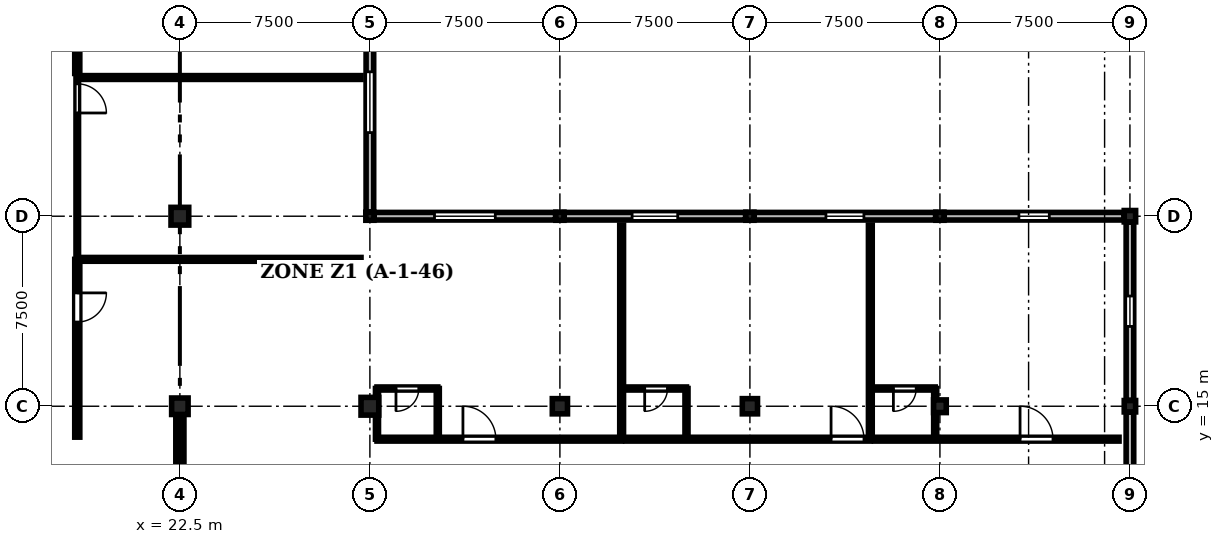
"""IFC4 building model, lengths in metres.
Left out: names, types, materials, properties, quantities, classifications, styles, units other than length and angle.
Written with IfcOpenShell. Run it as: python <this file> out.ifc"""

import sys

from ifc_helpers import new_model, si_unit, direction, frame, frame_2d, origin, origin_2d, place, context, subcontext, project, spatial, rectangle, extrude, element, fill, save


model = new_model("IFC4")
c1 = context("Model", 3, precision=1e-05, world=origin(), true_north=direction((0.0, 1.0)))
c2 = subcontext(c1, "Body", "Model", "MODEL_VIEW")
j1 = project(units=[si_unit("LENGTHUNIT", "METRE"), si_unit("PLANEANGLEUNIT", "RADIAN")], contexts=[c1])
p1 = place(None, origin())
s1 = spatial("IfcSite", under=j1, at=p1, CompositionType="ELEMENT")
p2 = place(p1, origin())
s2 = spatial("IfcBuilding", under=s1, at=p2, CompositionType="ELEMENT")
p3 = place(p2, frame((0.0, 0.0, 17.85)))
s3 = spatial("IfcBuildingStorey", under=s2, at=p3, CompositionType="ELEMENT", Elevation=17.85)
p4 = place(p3, frame((22.5, 15.0, 0.0), z_axis=(0.0, 0.0, 1.0), x_axis=(1.0, 0.0, 0.0)))
e1 = element("IfcColumn", 1, at=p4, inside=s3, PredefinedType="COLUMN", context=c2, shape_type="SweptSolid", body=[
    extrude(rectangle(XDim=0.65, YDim=0.65, at=origin_2d()), origin(), (0.0, 0.0, 1.0), 4.05),
])
for number, where, z_axis, x_axis in (
    (2, (22.5, 22.5, 0.0), (0.0, 0.0, 1.0), (1.0, 0.0, 0.0)),
    (3, (30.0, 15.0, 0.0), (0.0, 0.0, 1.0), (1.0, 0.0, 0.0)),
):
    element("IfcColumn", number, at=place(p3, frame(where, z_axis=z_axis, x_axis=x_axis)), inside=s3, PredefinedType="COLUMN", context=c2, shape_type="SweptSolid", body=[
        extrude(rectangle(XDim=0.7, YDim=0.7, at=origin_2d()), origin(), (0.0, 0.0, 1.0), 4.05),
    ])
p5 = place(p3, frame((30.0, 22.5, 0.0), z_axis=(0.0, 0.0, 1.0), x_axis=(1.0, 0.0, 0.0)))
e4 = element("IfcColumn", 4, at=p5, inside=s3, PredefinedType="COLUMN", context=c2, shape_type="SweptSolid", body=[
    extrude(rectangle(XDim=0.32, YDim=0.32, at=origin_2d()), origin(), (0.0, 0.0, 1.0), 4.05),
])
p6 = place(p3, frame((37.5, 15.0, 0.0), z_axis=(0.0, 0.0, 1.0), x_axis=(1.0, 0.0, 0.0)))
e5 = element("IfcColumn", 5, at=p6, inside=s3, PredefinedType="COLUMN", context=c2, shape_type="SweptSolid", body=[
    extrude(rectangle(XDim=0.6, YDim=0.6, at=origin_2d()), origin(), (0.0, 0.0, 1.0), 4.05),
])
p7 = place(p3, frame((37.5, 22.5, 0.0), z_axis=(0.0, 0.0, 1.0), x_axis=(1.0, 0.0, 0.0)))
e6 = element("IfcColumn", 6, at=p7, inside=s3, PredefinedType="COLUMN", context=c2, shape_type="SweptSolid", body=[
    extrude(rectangle(XDim=0.32, YDim=0.32, at=origin_2d()), origin(), (0.0, 0.0, 1.0), 4.05),
])
p8 = place(p3, frame((45.0, 15.0, 0.0), z_axis=(0.0, 0.0, 1.0), x_axis=(1.0, 0.0, 0.0)))
e7 = element("IfcColumn", 7, at=p8, inside=s3, PredefinedType="COLUMN", context=c2, shape_type="SweptSolid", body=[
    extrude(rectangle(XDim=0.6, YDim=0.6, at=origin_2d()), origin(), (0.0, 0.0, 1.0), 4.05),
])
p9 = place(p3, frame((45.0, 22.5, 0.0), z_axis=(0.0, 0.0, 1.0), x_axis=(1.0, 0.0, 0.0)))
e8 = element("IfcColumn", 8, at=p9, inside=s3, PredefinedType="COLUMN", context=c2, shape_type="SweptSolid", body=[
    extrude(rectangle(XDim=0.32, YDim=0.32, at=origin_2d()), origin(), (0.0, 0.0, 1.0), 4.05),
])
p10 = place(p3, frame((52.5, 15.0, 0.0), z_axis=(0.0, 0.0, 1.0), x_axis=(1.0, 0.0, 0.0)))
e9 = element("IfcColumn", 9, at=p10, inside=s3, PredefinedType="COLUMN", context=c2, shape_type="SweptSolid", body=[
    extrude(rectangle(XDim=0.5, YDim=0.5, at=origin_2d()), origin(), (0.0, 0.0, 1.0), 4.05),
])
p11 = place(p3, frame((52.5, 22.5, 0.0), z_axis=(0.0, 0.0, 1.0), x_axis=(1.0, 0.0, 0.0)))
e10 = element("IfcColumn", 10, at=p11, inside=s3, PredefinedType="COLUMN", context=c2, shape_type="SweptSolid", body=[
    extrude(rectangle(XDim=0.32, YDim=0.32, at=origin_2d()), origin(), (0.0, 0.0, 1.0), 4.05),
])
for number, where, z_axis, x_axis in (
    (11, (60.0, 15.0, 0.0), (0.0, 0.0, 1.0), (1.0, 0.0, 0.0)),
    (12, (60.0, 22.5, 0.0), (0.0, 0.0, 1.0), (1.0, 0.0, 0.0)),
):
    element("IfcColumn", number, at=place(p3, frame(where, z_axis=z_axis, x_axis=x_axis)), inside=s3, PredefinedType="COLUMN", context=c2, shape_type="SweptSolid", body=[
        extrude(rectangle(XDim=0.45, YDim=0.45, at=origin_2d()), origin(), (0.0, 0.0, 1.0), 4.05),
    ])
p12 = place(p3, frame((22.5, 7.95, 0.0), z_axis=(0.0, 0.0, 1.0), x_axis=(0.0, 1.0, 0.0)))
e13 = element("IfcWall", 13, at=p12, inside=s3, PredefinedType="SHEAR", context=c2, shape_type="SweptSolid", body=[
    extrude(rectangle(XDim=6.6, YDim=0.32, at=frame_2d((3.3, 0.0))), origin(), (0.0, 0.0, 1.0), 3.22),
])
p13 = place(p3, frame((30.0, 31.33, 0.0), z_axis=(0.0, 0.0, 1.0), x_axis=(0.0, -1.0, 0.0)))
e14 = element("IfcWall", 14, at=p13, inside=s3, PredefinedType="STANDARD", context=c2, shape_type="SweptSolid", body=[
    extrude(rectangle(XDim=8.66, YDim=0.3, at=frame_2d((4.33, 0.0))), origin(), (0.0, 0.0, 1.0), 3.22),
])
p14 = place(p13, frame((3.13, 0.0, 0.9)))
e15 = element("IfcOpeningElement", 15, at=p14, cuts=e14, PredefinedType="OPENING", context=c2, shape_type="SweptSolid", body=[
    extrude(rectangle(XDim=2.4, YDim=2.04, at=frame_2d((1.2, 1.02))), frame((0.0, 0.16, 0.0), z_axis=(0.0, -1.0, 0.0), x_axis=(1.0, 0.0, 0.0)), (0.0, 0.0, 1.0), 0.32),
])
p15 = place(p3, frame((30.17, 22.5, 0.0), z_axis=(0.0, 0.0, 1.0), x_axis=(1.0, 0.0, 0.0)))
e16 = element("IfcWall", 16, at=p15, inside=s3, PredefinedType="STANDARD", context=c2, shape_type="SweptSolid", body=[
    extrude(rectangle(XDim=7.16, YDim=0.3, at=frame_2d((3.58, 0.0))), origin(), (0.0, 0.0, 1.0), 3.17),
])
p16 = place(p15, frame((2.38, 0.0, 0.9)))
e17 = element("IfcOpeningElement", 17, at=p16, cuts=e16, PredefinedType="OPENING", context=c2, shape_type="SweptSolid", body=[
    extrude(rectangle(XDim=2.4, YDim=1.99, at=frame_2d((1.2, 0.995))), frame((0.0, 0.16, 0.0), z_axis=(0.0, -1.0, 0.0), x_axis=(1.0, 0.0, 0.0)), (0.0, 0.0, 1.0), 0.32),
])
p17 = place(p3, frame((37.67, 22.5, 0.0), z_axis=(0.0, 0.0, 1.0), x_axis=(1.0, 0.0, 0.0)))
e18 = element("IfcWall", 18, at=p17, inside=s3, PredefinedType="STANDARD", context=c2, shape_type="SweptSolid", body=[
    extrude(rectangle(XDim=7.16, YDim=0.3, at=frame_2d((3.58, 0.0))), origin(), (0.0, 0.0, 1.0), 3.17),
])
p18 = place(p17, frame((2.68, 0.0, 0.9)))
e19 = element("IfcOpeningElement", 19, at=p18, cuts=e18, PredefinedType="OPENING", context=c2, shape_type="SweptSolid", body=[
    extrude(rectangle(XDim=1.8, YDim=1.99, at=frame_2d((0.9, 0.995))), frame((0.0, 0.16, 0.0), z_axis=(0.0, -1.0, 0.0), x_axis=(1.0, 0.0, 0.0)), (0.0, 0.0, 1.0), 0.32),
])
p19 = place(p3, frame((45.17, 22.5, 0.0), z_axis=(0.0, 0.0, 1.0), x_axis=(1.0, 0.0, 0.0)))
e20 = element("IfcWall", 20, at=p19, inside=s3, PredefinedType="STANDARD", context=c2, shape_type="SweptSolid", body=[
    extrude(rectangle(XDim=7.16, YDim=0.3, at=frame_2d((3.58, 0.0))), origin(), (0.0, 0.0, 1.0), 3.17),
])
p20 = place(p19, frame((2.83, 0.0, 0.9)))
e21 = element("IfcOpeningElement", 21, at=p20, cuts=e20, PredefinedType="OPENING", context=c2, shape_type="SweptSolid", body=[
    extrude(rectangle(XDim=1.5, YDim=1.99, at=frame_2d((0.75, 0.995))), frame((0.0, 0.16, 0.0), z_axis=(0.0, -1.0, 0.0), x_axis=(1.0, 0.0, 0.0)), (0.0, 0.0, 1.0), 0.32),
])
p21 = place(p3, frame((60.0, 14.765, 0.0), z_axis=(0.0, 0.0, 1.0), x_axis=(0.0, -1.0, 0.0)))
e22 = element("IfcWall", 22, at=p21, inside=s3, PredefinedType="STANDARD", context=c2, shape_type="SweptSolid", body=[
    extrude(rectangle(XDim=7.03, YDim=0.3, at=frame_2d((3.515, 0.0))), origin(), (0.0, 0.0, 1.0), 3.17),
])
p22 = place(p21, frame((2.765, 0.0, 0.9)))
e23 = element("IfcOpeningElement", 23, at=p22, cuts=e22, PredefinedType="OPENING", context=c2, shape_type="SweptSolid", body=[
    extrude(rectangle(XDim=1.5, YDim=1.99, at=frame_2d((0.75, 0.995))), frame((0.0, 0.16, 0.0), z_axis=(0.0, -1.0, 0.0), x_axis=(1.0, 0.0, 0.0)), (0.0, 0.0, 1.0), 0.32),
])
p23 = place(p3, frame((52.67, 22.5, 0.0), z_axis=(0.0, 0.0, 1.0), x_axis=(1.0, 0.0, 0.0)))
e24 = element("IfcWall", 24, at=p23, inside=s3, PredefinedType="STANDARD", context=c2, shape_type="SweptSolid", body=[
    extrude(rectangle(XDim=7.095, YDim=0.3, at=frame_2d((3.547, 0.0))), origin(), (0.0, 0.0, 1.0), 3.17),
])
p24 = place(p23, frame((2.948, 0.0, 0.9)))
e25 = element("IfcOpeningElement", 25, at=p24, cuts=e24, PredefinedType="OPENING", context=c2, shape_type="SweptSolid", body=[
    extrude(rectangle(XDim=1.2, YDim=1.99, at=frame_2d((0.6, 0.995))), frame((0.0, 0.16, 0.0), z_axis=(0.0, -1.0, 0.0), x_axis=(1.0, 0.0, 0.0)), (0.0, 0.0, 1.0), 0.32),
])
p25 = place(p3, frame((60.0, 22.265, 0.0), z_axis=(0.0, 0.0, 1.0), x_axis=(0.0, -1.0, 0.0)))
e26 = element("IfcWall", 26, at=p25, inside=s3, PredefinedType="STANDARD", context=c2, shape_type="SweptSolid", body=[
    extrude(rectangle(XDim=7.03, YDim=0.3, at=frame_2d((3.515, 0.0))), origin(), (0.0, 0.0, 1.0), 3.17),
])
p26 = place(p25, frame((2.915, 0.0, 0.9)))
e27 = element("IfcOpeningElement", 27, at=p26, cuts=e26, PredefinedType="OPENING", context=c2, shape_type="SweptSolid", body=[
    extrude(rectangle(XDim=1.2, YDim=1.99, at=frame_2d((0.6, 0.995))), frame((0.0, 0.16, 0.0), z_axis=(0.0, -1.0, 0.0), x_axis=(1.0, 0.0, 0.0)), (0.0, 0.0, 1.0), 0.32),
])
p27 = place(p3, frame((18.45, 20.797, 0.0), z_axis=(0.0, 0.0, 1.0), x_axis=(0.0, -1.0, 0.0)))
e28 = element("IfcWall", 28, at=p27, inside=s3, PredefinedType="STANDARD", context=c2, shape_type="SweptSolid", body=[
    extrude(rectangle(XDim=7.017, YDim=0.2, at=frame_2d((3.509, 0.0))), origin(), (0.0, 0.0, 1.0), 3.755),
])
p28 = place(p27, frame((1.323, 0.0, 0.0)))
e29 = element("IfcOpeningElement", 29, at=p28, cuts=e28, PredefinedType="OPENING", context=c2, shape_type="SweptSolid", body=[
    extrude(rectangle(XDim=1.15, YDim=2.2, at=frame_2d((0.575, 1.1))), frame((0.0, 0.11, 0.0), z_axis=(0.0, -1.0, 0.0), x_axis=(1.0, 0.0, 0.0)), (0.0, 0.0, 1.0), 0.22),
])
p29 = place(p3, frame((18.45, 27.975, 0.0), z_axis=(0.0, 0.0, 1.0), x_axis=(0.0, -1.0, 0.0)))
e30 = element("IfcWall", 30, at=p29, inside=s3, PredefinedType="PARTITIONING", context=c2, shape_type="SweptSolid", body=[
    extrude(rectangle(XDim=7.017, YDim=0.1, at=frame_2d((3.509, 0.0))), origin(), (0.0, 0.0, 1.0), 3.355),
])
p30 = place(p29, frame((0.25, 0.0, 0.0)))
e31 = element("IfcOpeningElement", 31, at=p30, cuts=e30, PredefinedType="OPENING", context=c2, shape_type="SweptSolid", body=[
    extrude(rectangle(XDim=1.15, YDim=2.2, at=frame_2d((0.575, 1.1))), frame((0.0, 0.06, 0.0), z_axis=(0.0, -1.0, 0.0), x_axis=(1.0, 0.0, 0.0)), (0.0, 0.0, 1.0), 0.12),
])
p31 = place(p3, frame((18.45, 35.152, 0.0), z_axis=(0.0, 0.0, 1.0), x_axis=(0.0, -1.0, 0.0)))
e32 = element("IfcWall", 32, at=p31, inside=s3, PredefinedType="STANDARD", context=c2, shape_type="SweptSolid", body=[
    extrude(rectangle(XDim=7.017, YDim=0.2, at=frame_2d((3.509, 0.0))), origin(), (0.0, 0.0, 1.0), 3.355),
])
p32 = place(p31, frame((0.25, 0.0, 0.0)))
e33 = element("IfcOpeningElement", 33, at=p32, cuts=e32, PredefinedType="OPENING", context=c2, shape_type="SweptSolid", body=[
    extrude(rectangle(XDim=1.05, YDim=2.2, at=frame_2d((0.525, 1.1))), frame((0.0, 0.11, 0.0), z_axis=(0.0, -1.0, 0.0), x_axis=(1.0, 0.0, 0.0)), (0.0, 0.0, 1.0), 0.22),
])
p33 = place(p3, frame((30.28, 13.7, 0.0), z_axis=(0.0, 0.0, 1.0), x_axis=(1.0, 0.0, 0.0)))
e34 = element("IfcWall", 34, at=p33, inside=s3, PredefinedType="PARTITIONING", context=c2, shape_type="SweptSolid", body=[
    extrude(rectangle(XDim=9.657, YDim=0.15, at=frame_2d((4.828, 0.0))), origin(), (0.0, 0.0, 1.0), 3.755),
])
p34 = place(p33, frame((3.393, 0.0, 0.0)))
e35 = element("IfcOpeningElement", 35, at=p34, cuts=e34, PredefinedType="OPENING", context=c2, shape_type="SweptSolid", body=[
    extrude(rectangle(XDim=1.3, YDim=2.2, at=frame_2d((0.65, 1.1))), frame((0.0, 0.085, 0.0), z_axis=(0.0, -1.0, 0.0), x_axis=(1.0, 0.0, 0.0)), (0.0, 0.0, 1.0), 0.17),
])
p35 = place(p3, frame((32.68, 15.7, 0.0), z_axis=(0.0, 0.0, 1.0), x_axis=(-1.0, 0.0, 0.0)))
e36 = element("IfcWall", 36, at=p35, inside=s3, PredefinedType="PARTITIONING", context=c2, shape_type="SweptSolid", body=[
    extrude(rectangle(XDim=2.4, YDim=0.12, at=frame_2d((1.2, 0.0))), origin(), (0.0, 0.0, 1.0), 3.755),
])
p36 = place(p35, frame((0.75, 0.0, 0.0)))
e37 = element("IfcOpeningElement", 37, at=p36, cuts=e36, PredefinedType="OPENING", context=c2, shape_type="SweptSolid", body=[
    extrude(rectangle(XDim=0.9, YDim=2.1, at=frame_2d((0.45, 1.05))), frame((0.0, 0.07, 0.0), z_axis=(0.0, -1.0, 0.0), x_axis=(1.0, 0.0, 0.0)), (0.0, 0.0, 1.0), 0.14),
])
p37 = place(p3, frame((32.68, 13.7, 0.0), z_axis=(0.0, 0.0, 1.0), x_axis=(0.0, 1.0, 0.0)))
e38 = element("IfcWall", 38, at=p37, inside=s3, PredefinedType="PARTITIONING", context=c2, shape_type="SweptSolid", body=[
    extrude(rectangle(XDim=2.0, YDim=0.12, at=frame_2d((1.0, 0.0))), origin(), (0.0, 0.0, 1.0), 3.755),
])
p38 = place(p3, frame((40.097, 13.7, 0.0), z_axis=(0.0, 0.0, 1.0), x_axis=(1.0, 0.0, 0.0)))
e39 = element("IfcWall", 39, at=p38, inside=s3, PredefinedType="PARTITIONING", context=c2, shape_type="SweptSolid", body=[
    extrude(rectangle(XDim=9.657, YDim=0.15, at=frame_2d((4.828, 0.0))), origin(), (0.0, 0.0, 1.0), 3.755),
])
p39 = place(p38, frame((8.107, 0.0, 0.0)))
e40 = element("IfcOpeningElement", 40, at=p39, cuts=e39, PredefinedType="OPENING", context=c2, shape_type="SweptSolid", body=[
    extrude(rectangle(XDim=1.3, YDim=2.2, at=frame_2d((0.65, 1.1))), frame((0.0, 0.085, 0.0), z_axis=(0.0, -1.0, 0.0), x_axis=(1.0, 0.0, 0.0)), (0.0, 0.0, 1.0), 0.17),
])
p40 = place(p3, frame((42.497, 15.7, 0.0), z_axis=(0.0, 0.0, 1.0), x_axis=(-1.0, 0.0, 0.0)))
e41 = element("IfcWall", 41, at=p40, inside=s3, PredefinedType="PARTITIONING", context=c2, shape_type="SweptSolid", body=[
    extrude(rectangle(XDim=2.4, YDim=0.12, at=frame_2d((1.2, 0.0))), origin(), (0.0, 0.0, 1.0), 3.755),
])
p41 = place(p40, frame((0.75, 0.0, 0.0)))
e42 = element("IfcOpeningElement", 42, at=p41, cuts=e41, PredefinedType="OPENING", context=c2, shape_type="SweptSolid", body=[
    extrude(rectangle(XDim=0.9, YDim=2.1, at=frame_2d((0.45, 1.05))), frame((0.0, 0.07, 0.0), z_axis=(0.0, -1.0, 0.0), x_axis=(1.0, 0.0, 0.0)), (0.0, 0.0, 1.0), 0.14),
])
p42 = place(p3, frame((42.497, 13.7, 0.0), z_axis=(0.0, 0.0, 1.0), x_axis=(0.0, 1.0, 0.0)))
e43 = element("IfcWall", 43, at=p42, inside=s3, PredefinedType="PARTITIONING", context=c2, shape_type="SweptSolid", body=[
    extrude(rectangle(XDim=2.0, YDim=0.12, at=frame_2d((1.0, 0.0))), origin(), (0.0, 0.0, 1.0), 3.755),
])
p43 = place(p3, frame((49.913, 13.7, 0.0), z_axis=(0.0, 0.0, 1.0), x_axis=(1.0, 0.0, 0.0)))
e44 = element("IfcWall", 44, at=p43, inside=s3, PredefinedType="PARTITIONING", context=c2, shape_type="SweptSolid", body=[
    extrude(rectangle(XDim=9.657, YDim=0.15, at=frame_2d((4.828, 0.0))), origin(), (0.0, 0.0, 1.0), 3.755),
])
p44 = place(p43, frame((5.75, 0.0, 0.0)))
e45 = element("IfcOpeningElement", 45, at=p44, cuts=e44, PredefinedType="OPENING", context=c2, shape_type="SweptSolid", body=[
    extrude(rectangle(XDim=1.3, YDim=2.2, at=frame_2d((0.65, 1.1))), frame((0.0, 0.085, 0.0), z_axis=(0.0, -1.0, 0.0), x_axis=(1.0, 0.0, 0.0)), (0.0, 0.0, 1.0), 0.17),
])
p45 = place(p3, frame((52.313, 15.7, 0.0), z_axis=(0.0, 0.0, 1.0), x_axis=(-1.0, 0.0, 0.0)))
e46 = element("IfcWall", 46, at=p45, inside=s3, PredefinedType="PARTITIONING", context=c2, shape_type="SweptSolid", body=[
    extrude(rectangle(XDim=2.4, YDim=0.12, at=frame_2d((1.2, 0.0))), origin(), (0.0, 0.0, 1.0), 3.755),
])
p46 = place(p45, frame((0.75, 0.0, 0.0)))
e47 = element("IfcOpeningElement", 47, at=p46, cuts=e46, PredefinedType="OPENING", context=c2, shape_type="SweptSolid", body=[
    extrude(rectangle(XDim=0.9, YDim=2.1, at=frame_2d((0.45, 1.05))), frame((0.0, 0.07, 0.0), z_axis=(0.0, -1.0, 0.0), x_axis=(1.0, 0.0, 0.0)), (0.0, 0.0, 1.0), 0.14),
])
p47 = place(p3, frame((52.313, 13.7, 0.0), z_axis=(0.0, 0.0, 1.0), x_axis=(0.0, 1.0, 0.0)))
e48 = element("IfcWall", 48, at=p47, inside=s3, PredefinedType="PARTITIONING", context=c2, shape_type="SweptSolid", body=[
    extrude(rectangle(XDim=2.0, YDim=0.12, at=frame_2d((1.0, 0.0))), origin(), (0.0, 0.0, 1.0), 3.205),
])
for number, where, z_axis, x_axis in (
    (49, (18.45, 20.797, 0.0), (0.0, 0.0, 1.0), (1.0, 0.0, 0.0)),
    (50, (18.45, 27.975, 0.0), (0.0, 0.0, 1.0), (1.0, 0.0, 0.0)),
):
    element("IfcWall", number, at=place(p3, frame(where, z_axis=z_axis, x_axis=x_axis)), inside=s3, PredefinedType="PARTITIONING", context=c2, shape_type="SweptSolid", body=[
        extrude(rectangle(XDim=11.2, YDim=0.15, at=frame_2d((5.6, 0.0))), origin(), (0.0, 0.0, 1.0), 3.755),
    ])
for number, where, z_axis, x_axis in (
    (51, (39.937, 13.7, 0.0), (0.0, 0.0, 1.0), (0.0, 1.0, 0.0)),
    (52, (49.753, 13.7, 0.0), (0.0, 0.0, 1.0), (0.0, 1.0, 0.0)),
):
    element("IfcWall", number, at=place(p3, frame(where, z_axis=z_axis, x_axis=x_axis)), inside=s3, PredefinedType="PARTITIONING", context=c2, shape_type="SweptSolid", body=[
        extrude(rectangle(XDim=8.45, YDim=0.15, at=frame_2d((4.225, 0.0))), origin(), (0.0, 0.0, 1.0), 3.755),
    ])
p48 = place(p3, frame((30.28, 13.7, 0.0), z_axis=(0.0, 0.0, 1.0), x_axis=(0.0, 1.0, 0.0)))
e53 = element("IfcWall", 53, at=p48, inside=s3, PredefinedType="PARTITIONING", context=c2, shape_type="SweptSolid", body=[
    extrude(rectangle(XDim=2.0, YDim=0.12, at=frame_2d((1.0, 0.0))), origin(), (0.0, 0.0, 1.0), 3.205),
])
p49 = place(p14, origin())
e54 = element("IfcWindow", 54, at=p49, inside=s3, PartitioningType="SINGLE_PANEL", PredefinedType="WINDOW", context=c2, shape_type="SweptSolid", body=[
    extrude(rectangle(XDim=2.4, YDim=2.04, at=frame_2d((1.2, 1.02))), frame((0.0, 0.03, 0.0), z_axis=(0.0, -1.0, 0.0), x_axis=(1.0, 0.0, 0.0)), (0.0, 0.0, 1.0), 0.06),
])
fill(e15, e54)
p50 = place(p16, origin())
e55 = element("IfcWindow", 55, at=p50, inside=s3, PartitioningType="SINGLE_PANEL", PredefinedType="WINDOW", context=c2, shape_type="SweptSolid", body=[
    extrude(rectangle(XDim=2.4, YDim=1.99, at=frame_2d((1.2, 0.995))), frame((0.0, 0.03, 0.0), z_axis=(0.0, -1.0, 0.0), x_axis=(1.0, 0.0, 0.0)), (0.0, 0.0, 1.0), 0.06),
])
fill(e17, e55)
p51 = place(p18, origin())
e56 = element("IfcWindow", 56, at=p51, inside=s3, PartitioningType="SINGLE_PANEL", PredefinedType="WINDOW", context=c2, shape_type="SweptSolid", body=[
    extrude(rectangle(XDim=1.8, YDim=1.99, at=frame_2d((0.9, 0.995))), frame((0.0, 0.03, 0.0), z_axis=(0.0, -1.0, 0.0), x_axis=(1.0, 0.0, 0.0)), (0.0, 0.0, 1.0), 0.06),
])
fill(e19, e56)
p52 = place(p20, origin())
e57 = element("IfcWindow", 57, at=p52, inside=s3, PartitioningType="SINGLE_PANEL", PredefinedType="WINDOW", context=c2, shape_type="SweptSolid", body=[
    extrude(rectangle(XDim=1.5, YDim=1.99, at=frame_2d((0.75, 0.995))), frame((0.0, 0.03, 0.0), z_axis=(0.0, -1.0, 0.0), x_axis=(1.0, 0.0, 0.0)), (0.0, 0.0, 1.0), 0.06),
])
fill(e21, e57)
p53 = place(p24, origin())
e58 = element("IfcWindow", 58, at=p53, inside=s3, PartitioningType="SINGLE_PANEL", PredefinedType="WINDOW", context=c2, shape_type="SweptSolid", body=[
    extrude(rectangle(XDim=1.2, YDim=1.99, at=frame_2d((0.6, 0.995))), frame((0.0, 0.03, 0.0), z_axis=(0.0, -1.0, 0.0), x_axis=(1.0, 0.0, 0.0)), (0.0, 0.0, 1.0), 0.06),
])
fill(e25, e58)
p54 = place(p26, origin())
e59 = element("IfcWindow", 59, at=p54, inside=s3, PartitioningType="SINGLE_PANEL", PredefinedType="WINDOW", context=c2, shape_type="SweptSolid", body=[
    extrude(rectangle(XDim=1.2, YDim=1.99, at=frame_2d((0.6, 0.995))), frame((0.0, 0.03, 0.0), z_axis=(0.0, -1.0, 0.0), x_axis=(1.0, 0.0, 0.0)), (0.0, 0.0, 1.0), 0.06),
])
fill(e27, e59)
p55 = place(p28, origin())
e60 = element("IfcDoor", 60, at=p55, inside=s3, OperationType="SINGLE_SWING_LEFT", PredefinedType="DOOR", context=c2, shape_type="SweptSolid", body=[
    extrude(rectangle(XDim=1.15, YDim=2.2, at=frame_2d((0.575, 1.1))), frame((0.0, 0.025, 0.0), z_axis=(0.0, -1.0, 0.0), x_axis=(1.0, 0.0, 0.0)), (0.0, 0.0, 1.0), 0.05),
])
fill(e29, e60)
p56 = place(p30, origin())
e61 = element("IfcDoor", 61, at=p56, inside=s3, OperationType="SINGLE_SWING_RIGHT", PredefinedType="DOOR", context=c2, shape_type="SweptSolid", body=[
    extrude(rectangle(XDim=1.15, YDim=2.2, at=frame_2d((0.575, 1.1))), frame((0.0, 0.025, 0.0), z_axis=(0.0, -1.0, 0.0), x_axis=(1.0, 0.0, 0.0)), (0.0, 0.0, 1.0), 0.05),
])
fill(e31, e61)
p57 = place(p34, origin())
e62 = element("IfcDoor", 62, at=p57, inside=s3, OperationType="SINGLE_SWING_LEFT", PredefinedType="DOOR", context=c2, shape_type="SweptSolid", body=[
    extrude(rectangle(XDim=1.3, YDim=2.2, at=frame_2d((0.65, 1.1))), frame((0.0, 0.025, 0.0), z_axis=(0.0, -1.0, 0.0), x_axis=(1.0, 0.0, 0.0)), (0.0, 0.0, 1.0), 0.05),
])
fill(e35, e62)
p58 = place(p36, origin())
e63 = element("IfcDoor", 63, at=p58, inside=s3, OperationType="SINGLE_SWING_RIGHT", PredefinedType="DOOR", context=c2, shape_type="SweptSolid", body=[
    extrude(rectangle(XDim=0.9, YDim=2.1, at=frame_2d((0.45, 1.05))), frame((0.0, 0.025, 0.0), z_axis=(0.0, -1.0, 0.0), x_axis=(1.0, 0.0, 0.0)), (0.0, 0.0, 1.0), 0.05),
])
fill(e37, e63)
p59 = place(p39, origin())
e64 = element("IfcDoor", 64, at=p59, inside=s3, OperationType="SINGLE_SWING_LEFT", PredefinedType="DOOR", context=c2, shape_type="SweptSolid", body=[
    extrude(rectangle(XDim=1.3, YDim=2.2, at=frame_2d((0.65, 1.1))), frame((0.0, 0.025, 0.0), z_axis=(0.0, -1.0, 0.0), x_axis=(1.0, 0.0, 0.0)), (0.0, 0.0, 1.0), 0.05),
])
fill(e40, e64)
p60 = place(p41, origin())
e65 = element("IfcDoor", 65, at=p60, inside=s3, OperationType="SINGLE_SWING_RIGHT", PredefinedType="DOOR", context=c2, shape_type="SweptSolid", body=[
    extrude(rectangle(XDim=0.9, YDim=2.1, at=frame_2d((0.45, 1.05))), frame((0.0, 0.025, 0.0), z_axis=(0.0, -1.0, 0.0), x_axis=(1.0, 0.0, 0.0)), (0.0, 0.0, 1.0), 0.05),
])
fill(e42, e65)
p61 = place(p44, origin())
e66 = element("IfcDoor", 66, at=p61, inside=s3, OperationType="SINGLE_SWING_LEFT", PredefinedType="DOOR", context=c2, shape_type="SweptSolid", body=[
    extrude(rectangle(XDim=1.3, YDim=2.2, at=frame_2d((0.65, 1.1))), frame((0.0, 0.025, 0.0), z_axis=(0.0, -1.0, 0.0), x_axis=(1.0, 0.0, 0.0)), (0.0, 0.0, 1.0), 0.05),
])
fill(e45, e66)
p62 = place(p46, origin())
e67 = element("IfcDoor", 67, at=p62, inside=s3, OperationType="SINGLE_SWING_RIGHT", PredefinedType="DOOR", context=c2, shape_type="SweptSolid", body=[
    extrude(rectangle(XDim=0.9, YDim=2.1, at=frame_2d((0.45, 1.05))), frame((0.0, 0.025, 0.0), z_axis=(0.0, -1.0, 0.0), x_axis=(1.0, 0.0, 0.0)), (0.0, 0.0, 1.0), 0.05),
])
fill(e47, e67)
save(model, sys.argv[1])
